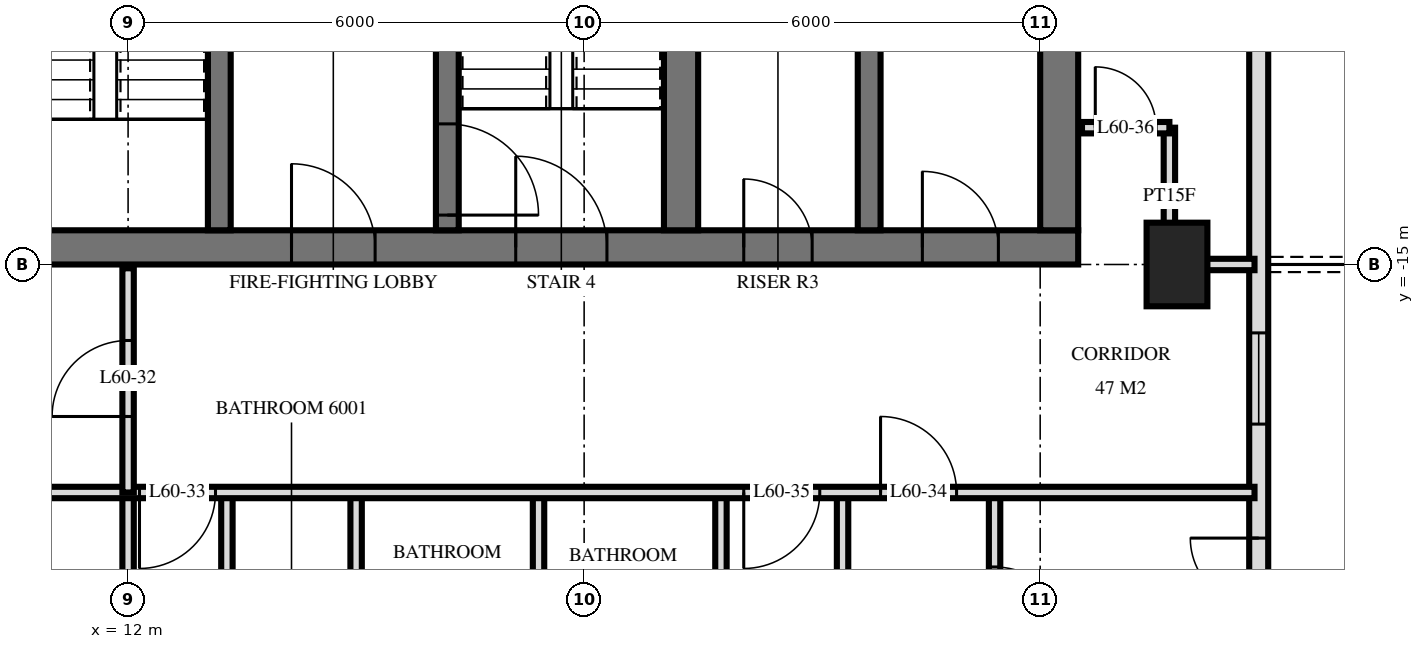
"""IFC4 building model, lengths in metres.
Left out: names, types, materials, properties, quantities, classifications, styles, units other than length and angle.
Written with IfcOpenShell. Run it as: python <this file> out.ifc"""

import sys

from ifc_helpers import new_model, si_unit, direction, frame, frame_2d, origin, origin_2d, place, context, subcontext, project, spatial, rectangle, extrude, element, fill, save


model = new_model("IFC4")
c1 = context("Model", 3, precision=1e-05, world=origin(), true_north=direction((0.0, 1.0)))
c2 = subcontext(c1, "Body", "Model", "MODEL_VIEW")
j1 = project(units=[si_unit("LENGTHUNIT", "METRE"), si_unit("PLANEANGLEUNIT", "RADIAN")], contexts=[c1])
p1 = place(None, origin())
s1 = spatial("IfcSite", under=j1, at=p1, CompositionType="ELEMENT")
p2 = place(p1, origin())
s2 = spatial("IfcBuilding", under=s1, at=p2, CompositionType="ELEMENT")
p3 = place(p2, frame((0.0, 0.0, 229.1)))
s3 = spatial("IfcBuildingStorey", under=s2, at=p3, CompositionType="ELEMENT", Elevation=229.1)
p4 = place(p3, frame((25.8, -15.0, 0.0), z_axis=(0.0, 0.0, 1.0), x_axis=(0.0, 1.0, 0.0)))
e1 = element("IfcColumn", 1, at=p4, inside=s3, PredefinedType="COLUMN", context=c2, shape_type="SweptSolid", body=[
    extrude(rectangle(XDim=1.1, YDim=0.8, at=origin_2d()), origin(), (0.0, 0.0, 1.0), 3.5),
])
p5 = place(p3, frame((10.0, -14.775, 0.0), z_axis=(0.0, 0.0, 1.0), x_axis=(1.0, 0.0, 0.0)))
e2 = element("IfcWall", 2, at=p5, inside=s3, PredefinedType="SHEAR", context=c2, shape_type="SweptSolid", body=[
    extrude(rectangle(XDim=14.5, YDim=0.45, at=frame_2d((7.25, 0.0))), origin(), (0.0, 0.0, 1.0), 3.5),
])
p6 = place(p5, frame((7.1, 0.0, 0.0)))
e3 = element("IfcOpeningElement", 3, at=p6, cuts=e2, PredefinedType="OPENING", context=c2, shape_type="SweptSolid", body=[
    extrude(rectangle(XDim=1.2, YDim=2.1, at=frame_2d((0.6, 1.05))), frame((0.0, 0.235, 0.0), z_axis=(0.0, -1.0, 0.0), x_axis=(1.0, 0.0, 0.0)), (0.0, 0.0, 1.0), 0.47),
])
p7 = place(p5, frame((4.15, 0.0, 0.0)))
e4 = element("IfcOpeningElement", 4, at=p7, cuts=e2, PredefinedType="OPENING", context=c2, shape_type="SweptSolid", body=[
    extrude(rectangle(XDim=1.1, YDim=2.1, at=frame_2d((0.55, 1.05))), frame((0.0, 0.235, 0.0), z_axis=(0.0, -1.0, 0.0), x_axis=(1.0, 0.0, 0.0)), (0.0, 0.0, 1.0), 0.47),
])
p8 = place(p5, frame((10.1, 0.0, 0.0)))
e5 = element("IfcOpeningElement", 5, at=p8, cuts=e2, PredefinedType="OPENING", context=c2, shape_type="SweptSolid", body=[
    extrude(rectangle(XDim=0.9, YDim=2.1, at=frame_2d((0.45, 1.05))), frame((0.0, 0.235, 0.0), z_axis=(0.0, -1.0, 0.0), x_axis=(1.0, 0.0, 0.0)), (0.0, 0.0, 1.0), 0.47),
])
p9 = place(p5, frame((12.45, 0.0, 0.0)))
e6 = element("IfcOpeningElement", 6, at=p9, cuts=e2, PredefinedType="OPENING", context=c2, shape_type="SweptSolid", body=[
    extrude(rectangle(XDim=1.0, YDim=2.1, at=frame_2d((0.5, 1.05))), frame((0.0, 0.235, 0.0), z_axis=(0.0, -1.0, 0.0), x_axis=(1.0, 0.0, 0.0)), (0.0, 0.0, 1.0), 0.47),
])
p10 = place(p3, frame((24.25, -14.55, 0.0), z_axis=(0.0, 0.0, 1.0), x_axis=(0.0, 1.0, 0.0)))
e7 = element("IfcWall", 7, at=p10, inside=s3, PredefinedType="SHEAR", context=c2, shape_type="SweptSolid", body=[
    extrude(rectangle(XDim=14.1, YDim=0.5, at=frame_2d((7.05, 0.0))), origin(), (0.0, 0.0, 1.0), 3.5),
])
p11 = place(p3, frame((13.2, -14.55, 0.0), z_axis=(0.0, 0.0, 1.0), x_axis=(0.0, 1.0, 0.0)))
e8 = element("IfcWall", 8, at=p11, inside=s3, PredefinedType="SHEAR", context=c2, shape_type="SweptSolid", body=[
    extrude(rectangle(XDim=5.4, YDim=0.3, at=frame_2d((2.7, 0.0))), origin(), (0.0, 0.0, 1.0), 3.5),
])
p12 = place(p11, frame((4.0, 0.0, 0.0)))
e9 = element("IfcOpeningElement", 9, at=p12, cuts=e8, PredefinedType="OPENING", context=c2, shape_type="SweptSolid", body=[
    extrude(rectangle(XDim=1.2, YDim=2.1, at=frame_2d((0.6, 1.05))), frame((0.0, 0.16, 0.0), z_axis=(0.0, -1.0, 0.0), x_axis=(1.0, 0.0, 0.0)), (0.0, 0.0, 1.0), 0.32),
])
p13 = place(p3, frame((16.2, -14.55, 0.0), z_axis=(0.0, 0.0, 1.0), x_axis=(0.0, 1.0, 0.0)))
e10 = element("IfcWall", 10, at=p13, inside=s3, PredefinedType="SHEAR", context=c2, shape_type="SweptSolid", body=[
    extrude(rectangle(XDim=5.4, YDim=0.3, at=frame_2d((2.7, 0.0))), origin(), (0.0, 0.0, 1.0), 3.5),
])
p14 = place(p13, frame((0.2, 0.0, 0.0)))
e11 = element("IfcOpeningElement", 11, at=p14, cuts=e10, PredefinedType="OPENING", context=c2, shape_type="SweptSolid", body=[
    extrude(rectangle(XDim=1.2, YDim=2.1, at=frame_2d((0.6, 1.05))), frame((0.0, 0.16, 0.0), z_axis=(0.0, -1.0, 0.0), x_axis=(1.0, 0.0, 0.0)), (0.0, 0.0, 1.0), 0.32),
])
p15 = place(p3, frame((19.275, -14.55, 0.0), z_axis=(0.0, 0.0, 1.0), x_axis=(0.0, 1.0, 0.0)))
e12 = element("IfcWall", 12, at=p15, inside=s3, PredefinedType="SHEAR", context=c2, shape_type="SweptSolid", body=[
    extrude(rectangle(XDim=5.4, YDim=0.45, at=frame_2d((2.7, 0.0))), origin(), (0.0, 0.0, 1.0), 3.5),
])
p16 = place(p3, frame((21.75, -14.55, 0.0), z_axis=(0.0, 0.0, 1.0), x_axis=(0.0, 1.0, 0.0)))
e13 = element("IfcWall", 13, at=p16, inside=s3, PredefinedType="SHEAR", context=c2, shape_type="SweptSolid", body=[
    extrude(rectangle(XDim=5.4, YDim=0.3, at=frame_2d((2.7, 0.0))), origin(), (0.0, 0.0, 1.0), 3.5),
])
p17 = place(p3, frame((26.875, -24.875, 0.0), z_axis=(0.0, 0.0, 1.0), x_axis=(0.0, 1.0, 0.0)))
e14 = element("IfcWall", 14, at=p17, inside=s3, PredefinedType="SOLIDWALL", context=c2, shape_type="SweptSolid", body=[
    extrude(rectangle(XDim=21.551, YDim=0.25, at=frame_2d((10.775, 0.0))), origin(), (0.0, 0.0, 1.0), 3.22),
])
p18 = place(p17, frame((0.575, 0.0, 0.0)))
e15 = element("IfcOpeningElement", 15, at=p18, cuts=e14, PredefinedType="OPENING", context=c2, shape_type="SweptSolid", body=[
    extrude(rectangle(XDim=1.8, YDim=2.4, at=frame_2d((0.9, 1.2))), frame((0.0, 0.135, 0.0), z_axis=(0.0, -1.0, 0.0), x_axis=(1.0, 0.0, 0.0)), (0.0, 0.0, 1.0), 0.27),
])
p19 = place(p17, frame((4.475, 0.0, 0.0)))
e16 = element("IfcOpeningElement", 16, at=p19, cuts=e14, PredefinedType="OPENING", context=c2, shape_type="SweptSolid", body=[
    extrude(rectangle(XDim=1.8, YDim=2.4, at=frame_2d((0.9, 1.2))), frame((0.0, 0.135, 0.0), z_axis=(0.0, -1.0, 0.0), x_axis=(1.0, 0.0, 0.0)), (0.0, 0.0, 1.0), 0.27),
])
p20 = place(p17, frame((7.775, 0.0, 0.9)))
e17 = element("IfcOpeningElement", 17, at=p20, cuts=e14, PredefinedType="OPENING", context=c2, shape_type="SweptSolid", body=[
    extrude(rectangle(XDim=1.2, YDim=1.5, at=frame_2d((0.6, 0.75))), frame((0.0, 0.135, 0.0), z_axis=(0.0, -1.0, 0.0), x_axis=(1.0, 0.0, 0.0)), (0.0, 0.0, 1.0), 0.27),
])
p21 = place(p17, frame((13.1, 0.0, 0.0)))
e18 = element("IfcOpeningElement", 18, at=p21, cuts=e14, PredefinedType="OPENING", context=c2, shape_type="SweptSolid", body=[
    extrude(rectangle(XDim=1.8, YDim=2.4, at=frame_2d((0.9, 1.2))), frame((0.0, 0.135, 0.0), z_axis=(0.0, -1.0, 0.0), x_axis=(1.0, 0.0, 0.0)), (0.0, 0.0, 1.0), 0.27),
])
p22 = place(p3, frame((25.7, -15.0, 0.0), z_axis=(0.0, 0.0, 1.0), x_axis=(0.0, 1.0, 0.0)))
e19 = element("IfcWall", 19, at=p22, inside=s3, PredefinedType="PARTITIONING", context=c2, shape_type="SweptSolid", body=[
    extrude(rectangle(XDim=1.8, YDim=0.15, at=frame_2d((0.9, 0.0))), origin(), (0.0, 0.0, 1.0), 3.22),
])
p23 = place(p3, frame((23.4, -21.0, 0.0), z_axis=(0.0, 0.0, 1.0), x_axis=(0.0, 1.0, 0.0)))
e20 = element("IfcWall", 20, at=p23, inside=s3, PredefinedType="PARTITIONING", context=c2, shape_type="SweptSolid", body=[
    extrude(rectangle(XDim=3.0, YDim=0.15, at=frame_2d((1.5, 0.0))), origin(), (0.0, 0.0, 1.0), 3.22),
])
p24 = place(p23, frame((1.02, 0.0, 0.0)))
e21 = element("IfcOpeningElement", 21, at=p24, cuts=e20, PredefinedType="OPENING", context=c2, shape_type="SweptSolid", body=[
    extrude(rectangle(XDim=1.0, YDim=2.1, at=frame_2d((0.5, 1.05))), frame((0.0, 0.085, 0.0), z_axis=(0.0, -1.0, 0.0), x_axis=(1.0, 0.0, 0.0)), (0.0, 0.0, 1.0), 0.17),
])
for number, where, z_axis, x_axis in (
    (22, (21.4, -21.0, 0.0), (0.0, 0.0, 1.0), (0.0, 1.0, 0.0)),
    (23, (19.8, -21.0, 0.0), (0.0, 0.0, 1.0), (0.0, 1.0, 0.0)),
    (24, (17.4, -21.0, 0.0), (0.0, 0.0, 1.0), (0.0, 1.0, 0.0)),
):
    element("IfcWall", number, at=place(p3, frame(where, z_axis=z_axis, x_axis=x_axis)), inside=s3, PredefinedType="PARTITIONING", context=c2, shape_type="SweptSolid", body=[
        extrude(rectangle(XDim=3.0, YDim=0.15, at=frame_2d((1.5, 0.0))), origin(), (0.0, 0.0, 1.0), 3.22),
    ])
p25 = place(p3, frame((15.0, -29.22, 0.0), z_axis=(0.0, 0.0, 1.0), x_axis=(0.0, 1.0, 0.0)))
e25 = element("IfcWall", 25, at=p25, inside=s3, PredefinedType="PARTITIONING", context=c2, shape_type="SweptSolid", body=[
    extrude(rectangle(XDim=11.22, YDim=0.15, at=frame_2d((5.61, 0.0))), origin(), (0.0, 0.0, 1.0), 3.22),
])
p26 = place(p3, frame((13.3, -21.0, 0.0), z_axis=(0.0, 0.0, 1.0), x_axis=(0.0, 1.0, 0.0)))
e26 = element("IfcWall", 26, at=p26, inside=s3, PredefinedType="PARTITIONING", context=c2, shape_type="SweptSolid", body=[
    extrude(rectangle(XDim=3.0, YDim=0.15, at=frame_2d((1.5, 0.0))), origin(), (0.0, 0.0, 1.0), 3.22),
])
p27 = place(p26, frame((1.12, 0.0, 0.0)))
e27 = element("IfcOpeningElement", 27, at=p27, cuts=e26, PredefinedType="OPENING", context=c2, shape_type="SweptSolid", body=[
    extrude(rectangle(XDim=0.8, YDim=2.1, at=frame_2d((0.4, 1.05))), frame((0.0, 0.085, 0.0), z_axis=(0.0, -1.0, 0.0), x_axis=(1.0, 0.0, 0.0)), (0.0, 0.0, 1.0), 0.17),
])
p28 = place(p3, frame((12.0, -18.0, 0.0), z_axis=(0.0, 0.0, 1.0), x_axis=(0.0, 1.0, 0.0)))
e28 = element("IfcWall", 28, at=p28, inside=s3, PredefinedType="PARTITIONING", context=c2, shape_type="SweptSolid", body=[
    extrude(rectangle(XDim=2.95, YDim=0.15, at=frame_2d((1.475, 0.0))), origin(), (0.0, 0.0, 1.0), 3.22),
])
p29 = place(p28, frame((1.0, 0.0, 0.0)))
e29 = element("IfcOpeningElement", 29, at=p29, cuts=e28, PredefinedType="OPENING", context=c2, shape_type="SweptSolid", body=[
    extrude(rectangle(XDim=1.0, YDim=2.1, at=frame_2d((0.5, 1.05))), frame((0.0, 0.085, 0.0), z_axis=(0.0, -1.0, 0.0), x_axis=(1.0, 0.0, 0.0)), (0.0, 0.0, 1.0), 0.17),
])
p30 = place(p3, frame((12.0, -29.22, 0.0), z_axis=(0.0, 0.0, 1.0), x_axis=(0.0, 1.0, 0.0)))
e30 = element("IfcWall", 30, at=p30, inside=s3, PredefinedType="PARTITIONING", context=c2, shape_type="SweptSolid", body=[
    extrude(rectangle(XDim=11.22, YDim=0.15, at=frame_2d((5.61, 0.0))), origin(), (0.0, 0.0, 1.0), 3.22),
])
p31 = place(p3, frame((-26.82, -18.0, 0.0), z_axis=(0.0, 0.0, 1.0), x_axis=(1.0, 0.0, 0.0)))
e31 = element("IfcWall", 31, at=p31, inside=s3, PredefinedType="PARTITIONING", context=c2, shape_type="SweptSolid", body=[
    extrude(rectangle(XDim=53.64, YDim=0.15, at=frame_2d((26.82, 0.0))), origin(), (0.0, 0.0, 1.0), 3.22),
])
p32 = place(p31, frame((11.32, 0.0, 0.0)))
e32 = element("IfcOpeningElement", 32, at=p32, cuts=e31, PredefinedType="OPENING", context=c2, shape_type="SweptSolid", body=[
    extrude(rectangle(XDim=1.0, YDim=2.1, at=frame_2d((0.5, 1.05))), frame((0.0, 0.085, 0.0), z_axis=(0.0, -1.0, 0.0), x_axis=(1.0, 0.0, 0.0)), (0.0, 0.0, 1.0), 0.17),
])
p33 = place(p31, frame((3.22, 0.0, 0.0)))
e33 = element("IfcOpeningElement", 33, at=p33, cuts=e31, PredefinedType="OPENING", context=c2, shape_type="SweptSolid", body=[
    extrude(rectangle(XDim=1.0, YDim=2.1, at=frame_2d((0.5, 1.05))), frame((0.0, 0.085, 0.0), z_axis=(0.0, -1.0, 0.0), x_axis=(1.0, 0.0, 0.0)), (0.0, 0.0, 1.0), 0.17),
])
p34 = place(p31, frame((5.02, 0.0, 0.0)))
e34 = element("IfcOpeningElement", 34, at=p34, cuts=e31, PredefinedType="OPENING", context=c2, shape_type="SweptSolid", body=[
    extrude(rectangle(XDim=1.0, YDim=2.1, at=frame_2d((0.5, 1.05))), frame((0.0, 0.085, 0.0), z_axis=(0.0, -1.0, 0.0), x_axis=(1.0, 0.0, 0.0)), (0.0, 0.0, 1.0), 0.17),
])
p35 = place(p31, frame((38.97, 0.0, 0.0)))
e35 = element("IfcOpeningElement", 35, at=p35, cuts=e31, PredefinedType="OPENING", context=c2, shape_type="SweptSolid", body=[
    extrude(rectangle(XDim=1.0, YDim=2.1, at=frame_2d((0.5, 1.05))), frame((0.0, 0.085, 0.0), z_axis=(0.0, -1.0, 0.0), x_axis=(1.0, 0.0, 0.0)), (0.0, 0.0, 1.0), 0.17),
])
p36 = place(p31, frame((48.72, 0.0, 0.0)))
e36 = element("IfcOpeningElement", 36, at=p36, cuts=e31, PredefinedType="OPENING", context=c2, shape_type="SweptSolid", body=[
    extrude(rectangle(XDim=1.0, YDim=2.1, at=frame_2d((0.5, 1.05))), frame((0.0, 0.085, 0.0), z_axis=(0.0, -1.0, 0.0), x_axis=(1.0, 0.0, 0.0)), (0.0, 0.0, 1.0), 0.17),
])
p37 = place(p31, frame((46.92, 0.0, 0.0)))
e37 = element("IfcOpeningElement", 37, at=p37, cuts=e31, PredefinedType="OPENING", context=c2, shape_type="SweptSolid", body=[
    extrude(rectangle(XDim=1.0, YDim=2.1, at=frame_2d((0.5, 1.05))), frame((0.0, 0.085, 0.0), z_axis=(0.0, -1.0, 0.0), x_axis=(1.0, 0.0, 0.0)), (0.0, 0.0, 1.0), 0.17),
])
p38 = place(p31, frame((18.82, 0.0, 0.0)))
e38 = element("IfcOpeningElement", 38, at=p38, cuts=e31, PredefinedType="OPENING", context=c2, shape_type="SweptSolid", body=[
    extrude(rectangle(XDim=1.0, YDim=2.1, at=frame_2d((0.5, 1.05))), frame((0.0, 0.085, 0.0), z_axis=(0.0, -1.0, 0.0), x_axis=(1.0, 0.0, 0.0)), (0.0, 0.0, 1.0), 0.17),
])
p39 = place(p31, frame((27.82, 0.0, 0.0)))
e39 = element("IfcOpeningElement", 39, at=p39, cuts=e31, PredefinedType="OPENING", context=c2, shape_type="SweptSolid", body=[
    extrude(rectangle(XDim=1.0, YDim=2.1, at=frame_2d((0.5, 1.05))), frame((0.0, 0.085, 0.0), z_axis=(0.0, -1.0, 0.0), x_axis=(1.0, 0.0, 0.0)), (0.0, 0.0, 1.0), 0.17),
])
p40 = place(p31, frame((35.32, 0.0, 0.0)))
e40 = element("IfcOpeningElement", 40, at=p40, cuts=e31, PredefinedType="OPENING", context=c2, shape_type="SweptSolid", body=[
    extrude(rectangle(XDim=1.0, YDim=2.1, at=frame_2d((0.5, 1.05))), frame((0.0, 0.085, 0.0), z_axis=(0.0, -1.0, 0.0), x_axis=(1.0, 0.0, 0.0)), (0.0, 0.0, 1.0), 0.17),
])
p41 = place(p3, frame((25.7, -15.0, 0.0), z_axis=(0.0, 0.0, 1.0), x_axis=(1.0, 0.0, 0.0)))
e41 = element("IfcWall", 41, at=p41, inside=s3, PredefinedType="PARTITIONING", context=c2, shape_type="SweptSolid", body=[
    extrude(rectangle(XDim=1.12, YDim=0.15, at=frame_2d((0.56, 0.0))), origin(), (0.0, 0.0, 1.0), 3.22),
])
p42 = place(p3, frame((24.55, -13.2, 0.0), z_axis=(0.0, 0.0, 1.0), x_axis=(1.0, 0.0, 0.0)))
e42 = element("IfcWall", 42, at=p42, inside=s3, PredefinedType="PARTITIONING", context=c2, shape_type="SweptSolid", body=[
    extrude(rectangle(XDim=1.15, YDim=0.15, at=frame_2d((0.575, 0.0))), origin(), (0.0, 0.0, 1.0), 3.22),
])
p43 = place(p42, frame((0.175, 0.0, 0.0)))
e43 = element("IfcOpeningElement", 43, at=p43, cuts=e42, PredefinedType="OPENING", context=c2, shape_type="SweptSolid", body=[
    extrude(rectangle(XDim=0.8, YDim=2.1, at=frame_2d((0.4, 1.05))), frame((0.0, 0.085, 0.0), z_axis=(0.0, -1.0, 0.0), x_axis=(1.0, 0.0, 0.0)), (0.0, 0.0, 1.0), 0.17),
])
p44 = place(p19, origin())
e44 = element("IfcDoor", 44, at=p44, inside=s3, OperationType="DOUBLE_DOOR_SINGLE_SWING", PredefinedType="DOOR", context=c2, shape_type="SweptSolid", body=[
    extrude(rectangle(XDim=1.8, YDim=2.4, at=frame_2d((0.9, 1.2))), frame((0.0, 0.025, 0.0), z_axis=(0.0, -1.0, 0.0), x_axis=(1.0, 0.0, 0.0)), (0.0, 0.0, 1.0), 0.05),
])
fill(e16, e44)
p45 = place(p20, origin())
e45 = element("IfcWindow", 45, at=p45, inside=s3, PartitioningType="SINGLE_PANEL", PredefinedType="WINDOW", context=c2, shape_type="SweptSolid", body=[
    extrude(rectangle(XDim=1.2, YDim=1.5, at=frame_2d((0.6, 0.75))), frame((0.0, 0.03, 0.0), z_axis=(0.0, -1.0, 0.0), x_axis=(1.0, 0.0, 0.0)), (0.0, 0.0, 1.0), 0.06),
])
fill(e17, e45)
p46 = place(p6, origin())
e46 = element("IfcDoor", 46, at=p46, inside=s3, OperationType="SINGLE_SWING_RIGHT", PredefinedType="DOOR", context=c2, shape_type="SweptSolid", body=[
    extrude(rectangle(XDim=1.2, YDim=2.1, at=frame_2d((0.6, 1.05))), frame((0.0, 0.025, 0.0), z_axis=(0.0, -1.0, 0.0), x_axis=(1.0, 0.0, 0.0)), (0.0, 0.0, 1.0), 0.05),
])
fill(e3, e46)
p47 = place(p7, origin())
e47 = element("IfcDoor", 47, at=p47, inside=s3, OperationType="SINGLE_SWING_RIGHT", PredefinedType="DOOR", context=c2, shape_type="SweptSolid", body=[
    extrude(rectangle(XDim=1.1, YDim=2.1, at=frame_2d((0.55, 1.05))), frame((0.0, 0.025, 0.0), z_axis=(0.0, -1.0, 0.0), x_axis=(1.0, 0.0, 0.0)), (0.0, 0.0, 1.0), 0.05),
])
fill(e4, e47)
p48 = place(p8, origin())
e48 = element("IfcDoor", 48, at=p48, inside=s3, OperationType="SINGLE_SWING_RIGHT", PredefinedType="DOOR", context=c2, shape_type="SweptSolid", body=[
    extrude(rectangle(XDim=0.9, YDim=2.1, at=frame_2d((0.45, 1.05))), frame((0.0, 0.025, 0.0), z_axis=(0.0, -1.0, 0.0), x_axis=(1.0, 0.0, 0.0)), (0.0, 0.0, 1.0), 0.05),
])
fill(e5, e48)
p49 = place(p9, origin())
e49 = element("IfcDoor", 49, at=p49, inside=s3, OperationType="SINGLE_SWING_RIGHT", PredefinedType="DOOR", context=c2, shape_type="SweptSolid", body=[
    extrude(rectangle(XDim=1.0, YDim=2.1, at=frame_2d((0.5, 1.05))), frame((0.0, 0.025, 0.0), z_axis=(0.0, -1.0, 0.0), x_axis=(1.0, 0.0, 0.0)), (0.0, 0.0, 1.0), 0.05),
])
fill(e6, e49)
p50 = place(p14, frame((0.6, 0.0, 0.0), z_axis=(0.0, 0.0, 1.0), x_axis=(-1.0, 0.0, 0.0)))
e50 = element("IfcDoor", 50, at=p50, inside=s3, OperationType="SINGLE_SWING_LEFT", PredefinedType="DOOR", context=c2, shape_type="SweptSolid", body=[
    extrude(rectangle(XDim=1.2, YDim=2.1, at=frame_2d((0.0, 1.05))), frame((0.0, -0.025, 0.0), z_axis=(0.0, 1.0, 0.0), x_axis=(-1.0, 0.0, 0.0)), (0.0, 0.0, 1.0), 0.05),
])
fill(e11, e50)
p51 = place(p29, origin())
e51 = element("IfcDoor", 51, at=p51, inside=s3, OperationType="SINGLE_SWING_RIGHT", PredefinedType="DOOR", context=c2, shape_type="SweptSolid", body=[
    extrude(rectangle(XDim=1.0, YDim=2.1, at=frame_2d((0.5, 1.05))), frame((0.0, 0.025, 0.0), z_axis=(0.0, -1.0, 0.0), x_axis=(1.0, 0.0, 0.0)), (0.0, 0.0, 1.0), 0.05),
])
fill(e29, e51)
p52 = place(p35, frame((0.5, 0.0, 0.0), z_axis=(0.0, 0.0, 1.0), x_axis=(-1.0, 0.0, 0.0)))
e52 = element("IfcDoor", 52, at=p52, inside=s3, OperationType="SINGLE_SWING_LEFT", PredefinedType="DOOR", context=c2, shape_type="SweptSolid", body=[
    extrude(rectangle(XDim=1.0, YDim=2.1, at=frame_2d((0.0, 1.05))), frame((0.0, -0.025, 0.0), z_axis=(0.0, 1.0, 0.0), x_axis=(-1.0, 0.0, 0.0)), (0.0, 0.0, 1.0), 0.05),
])
fill(e35, e52)
p53 = place(p36, origin())
e53 = element("IfcDoor", 53, at=p53, inside=s3, OperationType="SINGLE_SWING_RIGHT", PredefinedType="DOOR", context=c2, shape_type="SweptSolid", body=[
    extrude(rectangle(XDim=1.0, YDim=2.1, at=frame_2d((0.5, 1.05))), frame((0.0, 0.025, 0.0), z_axis=(0.0, -1.0, 0.0), x_axis=(1.0, 0.0, 0.0)), (0.0, 0.0, 1.0), 0.05),
])
fill(e36, e53)
p54 = place(p37, frame((0.5, 0.0, 0.0), z_axis=(0.0, 0.0, 1.0), x_axis=(-1.0, 0.0, 0.0)))
e54 = element("IfcDoor", 54, at=p54, inside=s3, OperationType="SINGLE_SWING_LEFT", PredefinedType="DOOR", context=c2, shape_type="SweptSolid", body=[
    extrude(rectangle(XDim=1.0, YDim=2.1, at=frame_2d((0.0, 1.05))), frame((0.0, -0.025, 0.0), z_axis=(0.0, 1.0, 0.0), x_axis=(-1.0, 0.0, 0.0)), (0.0, 0.0, 1.0), 0.05),
])
fill(e37, e54)
p55 = place(p43, origin())
e55 = element("IfcDoor", 55, at=p55, inside=s3, OperationType="SINGLE_SWING_RIGHT", PredefinedType="DOOR", context=c2, shape_type="SweptSolid", body=[
    extrude(rectangle(XDim=0.8, YDim=2.1, at=frame_2d((0.4, 1.05))), frame((0.0, 0.025, 0.0), z_axis=(0.0, -1.0, 0.0), x_axis=(1.0, 0.0, 0.0)), (0.0, 0.0, 1.0), 0.05),
])
fill(e43, e55)
p56 = place(p24, frame((0.5, 0.0, 0.0), z_axis=(0.0, 0.0, 1.0), x_axis=(-1.0, 0.0, 0.0)))
e56 = element("IfcDoor", 56, at=p56, inside=s3, OperationType="SINGLE_SWING_LEFT", PredefinedType="DOOR", context=c2, shape_type="SweptSolid", body=[
    extrude(rectangle(XDim=1.0, YDim=2.1, at=frame_2d((0.0, 1.05))), frame((0.0, -0.025, 0.0), z_axis=(0.0, 1.0, 0.0), x_axis=(-1.0, 0.0, 0.0)), (0.0, 0.0, 1.0), 0.05),
])
fill(e21, e56)
save(model, sys.argv[1])
